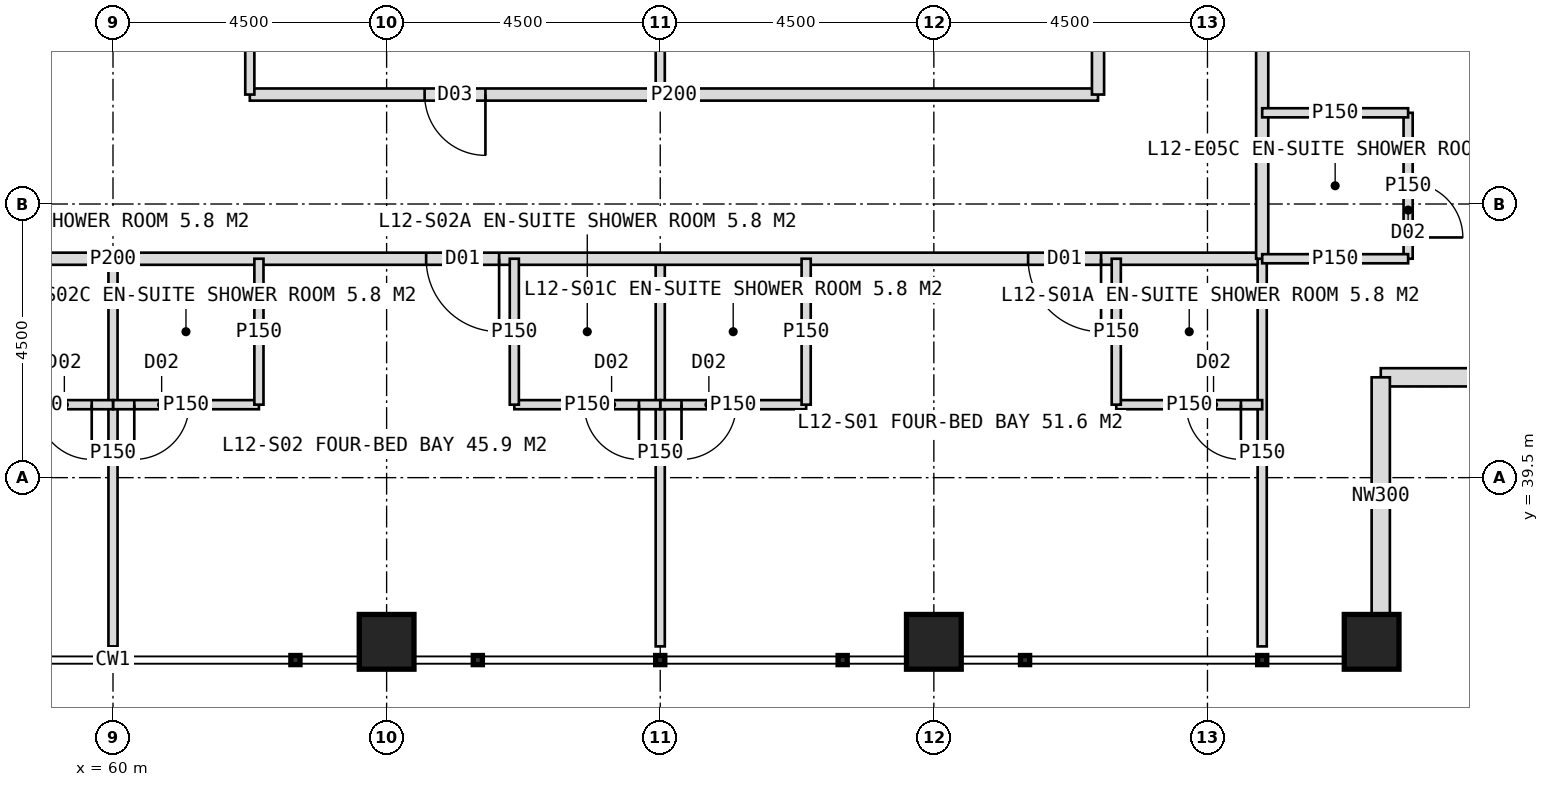
"""IFC4 building model, lengths in metres.
Left out: names, types, materials, properties, quantities, classifications, styles, units other than length and angle.
Written with IfcOpenShell. Run it as: python <this file> out.ifc"""

import sys

from ifc_helpers import new_model, si_unit, direction, frame, frame_2d, origin, origin_2d, place, context, subcontext, project, spatial, rectangle, hollow_rectangle, extrude, element, fill, save


model = new_model("IFC4")
c1 = context("Model", 3, precision=1e-05, world=origin(), true_north=direction((0.0, 1.0)))
c2 = subcontext(c1, "Body", "Model", "MODEL_VIEW")
j1 = project(units=[si_unit("LENGTHUNIT", "METRE"), si_unit("PLANEANGLEUNIT", "RADIAN")], contexts=[c1])
p1 = place(None, origin())
s1 = spatial("IfcSite", under=j1, at=p1, CompositionType="ELEMENT")
p2 = place(p1, origin())
s2 = spatial("IfcBuilding", under=s1, at=p2, CompositionType="ELEMENT")
p3 = place(p2, frame((0.0, 0.0, 55.0)))
s3 = spatial("IfcBuildingStorey", under=s2, at=p3, CompositionType="ELEMENT", Elevation=55.0)
for number, where, z_axis, x_axis in (
    (1, (64.5, 36.8, 0.0), (0.0, 0.0, 1.0), (1.0, 0.0, 0.0)),
    (2, (73.5, 36.8, 0.0), (0.0, 0.0, 1.0), (1.0, 0.0, 0.0)),
    (3, (80.7, 36.8, 0.0), (0.0, 0.0, 1.0), (1.0, 0.0, 0.0)),
):
    element("IfcColumn", number, at=place(p3, frame(where, z_axis=z_axis, x_axis=x_axis)), inside=s3, PredefinedType="COLUMN", context=c2, shape_type="SweptSolid", body=[
        extrude(hollow_rectangle(XDim=0.9, YDim=0.9, WallThickness=0.08, at=origin_2d()), origin(), (0.0, 0.0, 1.0), 4.0),
    ])
for number, where, z_axis, x_axis in (
    (4, (84.75, 41.15, 0.0), (0.0, 0.0, 1.0), (-1.0, 0.0, 0.0)),
    (5, (80.85, 41.15, 0.0), (0.0, 0.0, 1.0), (0.0, -1.0, 0.0)),
):
    element("IfcWall", number, at=place(p3, frame(where, z_axis=z_axis, x_axis=x_axis)), inside=s3, PredefinedType="ELEMENTEDWALL", context=c2, shape_type="SweptSolid", body=[
        extrude(rectangle(XDim=3.9, YDim=0.3, at=frame_2d((1.95, 0.0))), origin(), (0.0, 0.0, 1.0), 2.95),
    ])
p4 = place(p3, frame((69.0, 43.1, 0.0), z_axis=(0.0, 0.0, 1.0), x_axis=(0.0, -1.0, 0.0)))
e6 = element("IfcWall", 6, at=p4, inside=s3, PredefinedType="PARTITIONING", context=c2, shape_type="SweptSolid", body=[
    extrude(rectangle(XDim=6.375, YDim=0.15, at=frame_2d((3.188, 0.0))), origin(), (0.0, 0.0, 1.0), 3.75),
])
p5 = place(p3, frame((60.0, 43.1, 0.0), z_axis=(0.0, 0.0, 1.0), x_axis=(0.0, -1.0, 0.0)))
e7 = element("IfcWall", 7, at=p5, inside=s3, PredefinedType="PARTITIONING", context=c2, shape_type="SweptSolid", body=[
    extrude(rectangle(XDim=6.375, YDim=0.15, at=frame_2d((3.188, 0.0))), origin(), (0.0, 0.0, 1.0), 2.75),
])
p6 = place(p3, frame((78.9, 43.1, 0.0), z_axis=(0.0, 0.0, 1.0), x_axis=(-1.0, 0.0, 0.0)))
e8 = element("IfcWall", 8, at=p6, inside=s3, PredefinedType="PARTITIONING", context=c2, shape_type="SweptSolid", body=[
    extrude(rectangle(XDim=37.8, YDim=0.2, at=frame_2d((18.9, 0.0))), origin(), (0.0, 0.0, 1.0), 3.75),
])
p7 = place(p6, frame((2.65, 0.0, 0.0)))
e9 = element("IfcOpeningElement", 9, at=p7, cuts=e8, PredefinedType="OPENING", context=c2, shape_type="SweptSolid", body=[
    extrude(rectangle(XDim=1.2, YDim=2.2, at=frame_2d((0.6, 1.1))), frame((0.0, 0.11, 0.0), z_axis=(0.0, -1.0, 0.0), x_axis=(1.0, 0.0, 0.0)), (0.0, 0.0, 1.0), 0.22),
])
p8 = place(p6, frame((12.55, 0.0, 0.0)))
e10 = element("IfcOpeningElement", 10, at=p8, cuts=e8, PredefinedType="OPENING", context=c2, shape_type="SweptSolid", body=[
    extrude(rectangle(XDim=1.2, YDim=2.2, at=frame_2d((0.6, 1.1))), frame((0.0, 0.11, 0.0), z_axis=(0.0, -1.0, 0.0), x_axis=(1.0, 0.0, 0.0)), (0.0, 0.0, 1.0), 0.22),
])
p9 = place(p6, frame((21.55, 0.0, 0.0)))
e11 = element("IfcOpeningElement", 11, at=p9, cuts=e8, PredefinedType="OPENING", context=c2, shape_type="SweptSolid", body=[
    extrude(rectangle(XDim=1.2, YDim=2.2, at=frame_2d((0.6, 1.1))), frame((0.0, 0.11, 0.0), z_axis=(0.0, -1.0, 0.0), x_axis=(1.0, 0.0, 0.0)), (0.0, 0.0, 1.0), 0.22),
])
p10 = place(p6, frame((30.55, 0.0, 0.0)))
e12 = element("IfcOpeningElement", 12, at=p10, cuts=e8, PredefinedType="OPENING", context=c2, shape_type="SweptSolid", body=[
    extrude(rectangle(XDim=1.2, YDim=2.2, at=frame_2d((0.6, 1.1))), frame((0.0, 0.11, 0.0), z_axis=(0.0, -1.0, 0.0), x_axis=(1.0, 0.0, 0.0)), (0.0, 0.0, 1.0), 0.22),
])
p11 = place(p3, frame((78.9, 43.1, 0.0), z_axis=(0.0, 0.0, 1.0), x_axis=(0.0, -1.0, 0.0)))
e13 = element("IfcWall", 13, at=p11, inside=s3, PredefinedType="PARTITIONING", context=c2, shape_type="SweptSolid", body=[
    extrude(rectangle(XDim=6.375, YDim=0.15, at=frame_2d((3.188, 0.0))), origin(), (0.0, 0.0, 1.0), 3.75),
])
p12 = place(p3, frame((78.9, 40.7, 0.0), z_axis=(0.0, 0.0, 1.0), x_axis=(-1.0, 0.0, 0.0)))
e14 = element("IfcWall", 14, at=p12, inside=s3, PredefinedType="PARTITIONING", context=c2, shape_type="SweptSolid", body=[
    extrude(rectangle(XDim=2.4, YDim=0.15, at=frame_2d((1.2, 0.0))), origin(), (0.0, 0.0, 1.0), 3.75),
])
p13 = place(p12, frame((0.35, 0.0, 0.0)))
e15 = element("IfcOpeningElement", 15, at=p13, cuts=e14, PredefinedType="OPENING", context=c2, shape_type="SweptSolid", body=[
    extrude(rectangle(XDim=0.9, YDim=2.1, at=frame_2d((0.45, 1.05))), frame((0.0, 0.085, 0.0), z_axis=(0.0, -1.0, 0.0), x_axis=(1.0, 0.0, 0.0)), (0.0, 0.0, 1.0), 0.17),
])
p14 = place(p3, frame((76.5, 43.1, 0.0), z_axis=(0.0, 0.0, 1.0), x_axis=(0.0, -1.0, 0.0)))
e16 = element("IfcWall", 16, at=p14, inside=s3, PredefinedType="PARTITIONING", context=c2, shape_type="SweptSolid", body=[
    extrude(rectangle(XDim=2.4, YDim=0.15, at=frame_2d((1.2, 0.0))), origin(), (0.0, 0.0, 1.0), 3.75),
])
p15 = place(p3, frame((71.4, 40.7, 0.0), z_axis=(0.0, 0.0, 1.0), x_axis=(-1.0, 0.0, 0.0)))
e17 = element("IfcWall", 17, at=p15, inside=s3, PredefinedType="PARTITIONING", context=c2, shape_type="SweptSolid", body=[
    extrude(rectangle(XDim=2.4, YDim=0.15, at=frame_2d((1.2, 0.0))), origin(), (0.0, 0.0, 1.0), 3.75),
])
p16 = place(p15, frame((1.15, 0.0, 0.0)))
e18 = element("IfcOpeningElement", 18, at=p16, cuts=e17, PredefinedType="OPENING", context=c2, shape_type="SweptSolid", body=[
    extrude(rectangle(XDim=0.9, YDim=2.1, at=frame_2d((0.45, 1.05))), frame((0.0, 0.085, 0.0), z_axis=(0.0, -1.0, 0.0), x_axis=(1.0, 0.0, 0.0)), (0.0, 0.0, 1.0), 0.17),
])
p17 = place(p3, frame((71.4, 43.1, 0.0), z_axis=(0.0, 0.0, 1.0), x_axis=(0.0, -1.0, 0.0)))
e19 = element("IfcWall", 19, at=p17, inside=s3, PredefinedType="PARTITIONING", context=c2, shape_type="SweptSolid", body=[
    extrude(rectangle(XDim=2.4, YDim=0.15, at=frame_2d((1.2, 0.0))), origin(), (0.0, 0.0, 1.0), 3.75),
])
p18 = place(p3, frame((69.0, 40.7, 0.0), z_axis=(0.0, 0.0, 1.0), x_axis=(-1.0, 0.0, 0.0)))
e20 = element("IfcWall", 20, at=p18, inside=s3, PredefinedType="PARTITIONING", context=c2, shape_type="SweptSolid", body=[
    extrude(rectangle(XDim=2.4, YDim=0.15, at=frame_2d((1.2, 0.0))), origin(), (0.0, 0.0, 1.0), 3.75),
])
p19 = place(p18, frame((0.35, 0.0, 0.0)))
e21 = element("IfcOpeningElement", 21, at=p19, cuts=e20, PredefinedType="OPENING", context=c2, shape_type="SweptSolid", body=[
    extrude(rectangle(XDim=0.9, YDim=2.1, at=frame_2d((0.45, 1.05))), frame((0.0, 0.085, 0.0), z_axis=(0.0, -1.0, 0.0), x_axis=(1.0, 0.0, 0.0)), (0.0, 0.0, 1.0), 0.17),
])
p20 = place(p3, frame((66.6, 43.1, 0.0), z_axis=(0.0, 0.0, 1.0), x_axis=(0.0, -1.0, 0.0)))
e22 = element("IfcWall", 22, at=p20, inside=s3, PredefinedType="PARTITIONING", context=c2, shape_type="SweptSolid", body=[
    extrude(rectangle(XDim=2.4, YDim=0.15, at=frame_2d((1.2, 0.0))), origin(), (0.0, 0.0, 1.0), 3.75),
])
p21 = place(p3, frame((62.4, 40.7, 0.0), z_axis=(0.0, 0.0, 1.0), x_axis=(-1.0, 0.0, 0.0)))
e23 = element("IfcWall", 23, at=p21, inside=s3, PredefinedType="PARTITIONING", context=c2, shape_type="SweptSolid", body=[
    extrude(rectangle(XDim=2.4, YDim=0.15, at=frame_2d((1.2, 0.0))), origin(), (0.0, 0.0, 1.0), 3.75),
])
p22 = place(p21, frame((1.15, 0.0, 0.0)))
e24 = element("IfcOpeningElement", 24, at=p22, cuts=e23, PredefinedType="OPENING", context=c2, shape_type="SweptSolid", body=[
    extrude(rectangle(XDim=0.9, YDim=2.1, at=frame_2d((0.45, 1.05))), frame((0.0, 0.085, 0.0), z_axis=(0.0, -1.0, 0.0), x_axis=(1.0, 0.0, 0.0)), (0.0, 0.0, 1.0), 0.17),
])
p23 = place(p3, frame((62.4, 43.1, 0.0), z_axis=(0.0, 0.0, 1.0), x_axis=(0.0, -1.0, 0.0)))
e25 = element("IfcWall", 25, at=p23, inside=s3, PredefinedType="PARTITIONING", context=c2, shape_type="SweptSolid", body=[
    extrude(rectangle(XDim=2.4, YDim=0.15, at=frame_2d((1.2, 0.0))), origin(), (0.0, 0.0, 1.0), 3.75),
])
p24 = place(p3, frame((60.0, 40.7, 0.0), z_axis=(0.0, 0.0, 1.0), x_axis=(-1.0, 0.0, 0.0)))
e26 = element("IfcWall", 26, at=p24, inside=s3, PredefinedType="PARTITIONING", context=c2, shape_type="SweptSolid", body=[
    extrude(rectangle(XDim=2.4, YDim=0.15, at=frame_2d((1.2, 0.0))), origin(), (0.0, 0.0, 1.0), 3.75),
])
p25 = place(p24, frame((0.35, 0.0, 0.0)))
e27 = element("IfcOpeningElement", 27, at=p25, cuts=e26, PredefinedType="OPENING", context=c2, shape_type="SweptSolid", body=[
    extrude(rectangle(XDim=0.9, YDim=2.1, at=frame_2d((0.45, 1.05))), frame((0.0, 0.085, 0.0), z_axis=(0.0, -1.0, 0.0), x_axis=(1.0, 0.0, 0.0)), (0.0, 0.0, 1.0), 0.17),
])
p26 = place(p3, frame((69.0, 53.0, 0.0), z_axis=(0.0, 0.0, 1.0), x_axis=(0.0, -1.0, 0.0)))
e28 = element("IfcWall", 28, at=p26, inside=s3, PredefinedType="PARTITIONING", context=c2, shape_type="SweptSolid", body=[
    extrude(rectangle(XDim=7.2, YDim=0.15, at=frame_2d((3.6, 0.0))), origin(), (0.0, 0.0, 1.0), 3.75),
])
p27 = place(p3, frame((76.2, 45.8, 0.0), z_axis=(0.0, 0.0, 1.0), x_axis=(-1.0, 0.0, 0.0)))
e29 = element("IfcWall", 29, at=p27, inside=s3, PredefinedType="PARTITIONING", context=c2, shape_type="SweptSolid", body=[
    extrude(rectangle(XDim=13.95, YDim=0.2, at=frame_2d((6.975, 0.0))), origin(), (0.0, 0.0, 1.0), 3.75),
])
p28 = place(p27, frame((10.075, 0.0, 0.0)))
e30 = element("IfcOpeningElement", 30, at=p28, cuts=e29, PredefinedType="OPENING", context=c2, shape_type="SweptSolid", body=[
    extrude(rectangle(XDim=1.0, YDim=2.1, at=frame_2d((0.5, 1.05))), frame((0.0, 0.11, 0.0), z_axis=(0.0, -1.0, 0.0), x_axis=(1.0, 0.0, 0.0)), (0.0, 0.0, 1.0), 0.22),
])
p29 = place(p3, frame((62.25, 53.0, 0.0), z_axis=(0.0, 0.0, 1.0), x_axis=(0.0, -1.0, 0.0)))
e31 = element("IfcWall", 31, at=p29, inside=s3, PredefinedType="PARTITIONING", context=c2, shape_type="SweptSolid", body=[
    extrude(rectangle(XDim=7.2, YDim=0.15, at=frame_2d((3.6, 0.0))), origin(), (0.0, 0.0, 1.0), 3.75),
])
p30 = place(p3, frame((78.9, 80.9, 0.0), z_axis=(0.0, 0.0, 1.0), x_axis=(0.0, -1.0, 0.0)))
e32 = element("IfcWall", 32, at=p30, inside=s3, PredefinedType="PARTITIONING", context=c2, shape_type="SweptSolid", body=[
    extrude(rectangle(XDim=37.8, YDim=0.2, at=frame_2d((18.9, 0.0))), origin(), (0.0, 0.0, 1.0), 3.75),
])
p31 = place(p30, frame((3.25, 0.0, 0.0)))
e33 = element("IfcOpeningElement", 33, at=p31, cuts=e32, PredefinedType="OPENING", context=c2, shape_type="SweptSolid", body=[
    extrude(rectangle(XDim=1.2, YDim=2.2, at=frame_2d((0.6, 1.1))), frame((0.0, 0.11, 0.0), z_axis=(0.0, -1.0, 0.0), x_axis=(1.0, 0.0, 0.0)), (0.0, 0.0, 1.0), 0.22),
])
p32 = place(p30, frame((9.55, 0.0, 0.0)))
e34 = element("IfcOpeningElement", 34, at=p32, cuts=e32, PredefinedType="OPENING", context=c2, shape_type="SweptSolid", body=[
    extrude(rectangle(XDim=1.2, YDim=2.2, at=frame_2d((0.6, 1.1))), frame((0.0, 0.11, 0.0), z_axis=(0.0, -1.0, 0.0), x_axis=(1.0, 0.0, 0.0)), (0.0, 0.0, 1.0), 0.22),
])
p33 = place(p30, frame((15.55, 0.0, 0.0)))
e35 = element("IfcOpeningElement", 35, at=p33, cuts=e32, PredefinedType="OPENING", context=c2, shape_type="SweptSolid", body=[
    extrude(rectangle(XDim=1.2, YDim=2.2, at=frame_2d((0.6, 1.1))), frame((0.0, 0.11, 0.0), z_axis=(0.0, -1.0, 0.0), x_axis=(1.0, 0.0, 0.0)), (0.0, 0.0, 1.0), 0.22),
])
p34 = place(p30, frame((21.55, 0.0, 0.0)))
e36 = element("IfcOpeningElement", 36, at=p34, cuts=e32, PredefinedType="OPENING", context=c2, shape_type="SweptSolid", body=[
    extrude(rectangle(XDim=1.2, YDim=2.2, at=frame_2d((0.6, 1.1))), frame((0.0, 0.11, 0.0), z_axis=(0.0, -1.0, 0.0), x_axis=(1.0, 0.0, 0.0)), (0.0, 0.0, 1.0), 0.22),
])
p35 = place(p30, frame((30.55, 0.0, 0.0)))
e37 = element("IfcOpeningElement", 37, at=p35, cuts=e32, PredefinedType="OPENING", context=c2, shape_type="SweptSolid", body=[
    extrude(rectangle(XDim=1.2, YDim=2.2, at=frame_2d((0.6, 1.1))), frame((0.0, 0.11, 0.0), z_axis=(0.0, -1.0, 0.0), x_axis=(1.0, 0.0, 0.0)), (0.0, 0.0, 1.0), 0.22),
])
p36 = place(p3, frame((81.3, 45.5, 0.0), z_axis=(0.0, 0.0, 1.0), x_axis=(0.0, -1.0, 0.0)))
e38 = element("IfcWall", 38, at=p36, inside=s3, PredefinedType="PARTITIONING", context=c2, shape_type="SweptSolid", body=[
    extrude(rectangle(XDim=2.4, YDim=0.15, at=frame_2d((1.2, 0.0))), origin(), (0.0, 0.0, 1.0), 3.75),
])
p37 = place(p36, frame((1.15, 0.0, 0.0)))
e39 = element("IfcOpeningElement", 39, at=p37, cuts=e38, PredefinedType="OPENING", context=c2, shape_type="SweptSolid", body=[
    extrude(rectangle(XDim=0.9, YDim=2.1, at=frame_2d((0.45, 1.05))), frame((0.0, 0.085, 0.0), z_axis=(0.0, -1.0, 0.0), x_axis=(1.0, 0.0, 0.0)), (0.0, 0.0, 1.0), 0.17),
])
for number, where, z_axis, x_axis in (
    (40, (78.9, 45.5, 0.0), (0.0, 0.0, 1.0), (1.0, 0.0, 0.0)),
    (41, (78.9, 43.1, 0.0), (0.0, 0.0, 1.0), (1.0, 0.0, 0.0)),
):
    element("IfcWall", number, at=place(p3, frame(where, z_axis=z_axis, x_axis=x_axis)), inside=s3, PredefinedType="PARTITIONING", context=c2, shape_type="SweptSolid", body=[
        extrude(rectangle(XDim=2.4, YDim=0.15, at=frame_2d((1.2, 0.0))), origin(), (0.0, 0.0, 1.0), 3.75),
    ])
p38 = place(p3, frame((76.2, 62.0, 0.0), z_axis=(0.0, 0.0, 1.0), x_axis=(0.0, -1.0, 0.0)))
e42 = element("IfcWall", 42, at=p38, inside=s3, PredefinedType="PARTITIONING", context=c2, shape_type="SweptSolid", body=[
    extrude(rectangle(XDim=16.2, YDim=0.2, at=frame_2d((8.1, 0.0))), origin(), (0.0, 0.0, 1.0), 3.75),
])
p39 = place(p38, frame((4.0, 0.0, 0.0)))
e43 = element("IfcOpeningElement", 43, at=p39, cuts=e42, PredefinedType="OPENING", context=c2, shape_type="SweptSolid", body=[
    extrude(rectangle(XDim=1.0, YDim=2.1, at=frame_2d((0.5, 1.05))), frame((0.0, 0.11, 0.0), z_axis=(0.0, -1.0, 0.0), x_axis=(1.0, 0.0, 0.0)), (0.0, 0.0, 1.0), 0.22),
])
p40 = place(p38, frame((12.1, 0.0, 0.0)))
e44 = element("IfcOpeningElement", 44, at=p40, cuts=e42, PredefinedType="OPENING", context=c2, shape_type="SweptSolid", body=[
    extrude(rectangle(XDim=1.0, YDim=2.1, at=frame_2d((0.5, 1.05))), frame((0.0, 0.11, 0.0), z_axis=(0.0, -1.0, 0.0), x_axis=(1.0, 0.0, 0.0)), (0.0, 0.0, 1.0), 0.22),
])
p41 = place(p7, origin())
e45 = element("IfcDoor", 45, at=p41, inside=s3, OperationType="SINGLE_SWING_LEFT", PredefinedType="DOOR", context=c2, shape_type="SweptSolid", body=[
    extrude(rectangle(XDim=1.2, YDim=2.2, at=frame_2d((0.6, 1.1))), frame((0.0, 0.025, 0.0), z_axis=(0.0, -1.0, 0.0), x_axis=(1.0, 0.0, 0.0)), (0.0, 0.0, 1.0), 0.05),
])
fill(e9, e45)
p42 = place(p13, origin())
e46 = element("IfcDoor", 46, at=p42, inside=s3, OperationType="SINGLE_SWING_LEFT", PredefinedType="DOOR", context=c2, shape_type="SweptSolid", body=[
    extrude(rectangle(XDim=0.9, YDim=2.1, at=frame_2d((0.45, 1.05))), frame((0.0, 0.025, 0.0), z_axis=(0.0, -1.0, 0.0), x_axis=(1.0, 0.0, 0.0)), (0.0, 0.0, 1.0), 0.05),
])
fill(e15, e46)
p43 = place(p16, origin())
e47 = element("IfcDoor", 47, at=p43, inside=s3, OperationType="SINGLE_SWING_RIGHT", PredefinedType="DOOR", context=c2, shape_type="SweptSolid", body=[
    extrude(rectangle(XDim=0.9, YDim=2.1, at=frame_2d((0.45, 1.05))), frame((0.0, 0.025, 0.0), z_axis=(0.0, -1.0, 0.0), x_axis=(1.0, 0.0, 0.0)), (0.0, 0.0, 1.0), 0.05),
])
fill(e18, e47)
p44 = place(p8, origin())
e48 = element("IfcDoor", 48, at=p44, inside=s3, OperationType="SINGLE_SWING_LEFT", PredefinedType="DOOR", context=c2, shape_type="SweptSolid", body=[
    extrude(rectangle(XDim=1.2, YDim=2.2, at=frame_2d((0.6, 1.1))), frame((0.0, 0.025, 0.0), z_axis=(0.0, -1.0, 0.0), x_axis=(1.0, 0.0, 0.0)), (0.0, 0.0, 1.0), 0.05),
])
fill(e10, e48)
p45 = place(p19, origin())
e49 = element("IfcDoor", 49, at=p45, inside=s3, OperationType="SINGLE_SWING_LEFT", PredefinedType="DOOR", context=c2, shape_type="SweptSolid", body=[
    extrude(rectangle(XDim=0.9, YDim=2.1, at=frame_2d((0.45, 1.05))), frame((0.0, 0.025, 0.0), z_axis=(0.0, -1.0, 0.0), x_axis=(1.0, 0.0, 0.0)), (0.0, 0.0, 1.0), 0.05),
])
fill(e21, e49)
p46 = place(p22, origin())
e50 = element("IfcDoor", 50, at=p46, inside=s3, OperationType="SINGLE_SWING_RIGHT", PredefinedType="DOOR", context=c2, shape_type="SweptSolid", body=[
    extrude(rectangle(XDim=0.9, YDim=2.1, at=frame_2d((0.45, 1.05))), frame((0.0, 0.025, 0.0), z_axis=(0.0, -1.0, 0.0), x_axis=(1.0, 0.0, 0.0)), (0.0, 0.0, 1.0), 0.05),
])
fill(e24, e50)
p47 = place(p25, origin())
e51 = element("IfcDoor", 51, at=p47, inside=s3, OperationType="SINGLE_SWING_LEFT", PredefinedType="DOOR", context=c2, shape_type="SweptSolid", body=[
    extrude(rectangle(XDim=0.9, YDim=2.1, at=frame_2d((0.45, 1.05))), frame((0.0, 0.025, 0.0), z_axis=(0.0, -1.0, 0.0), x_axis=(1.0, 0.0, 0.0)), (0.0, 0.0, 1.0), 0.05),
])
fill(e27, e51)
p48 = place(p28, origin())
e52 = element("IfcDoor", 52, at=p48, inside=s3, OperationType="SINGLE_SWING_LEFT", PredefinedType="DOOR", context=c2, shape_type="SweptSolid", body=[
    extrude(rectangle(XDim=1.0, YDim=2.1, at=frame_2d((0.5, 1.05))), frame((0.0, 0.025, 0.0), z_axis=(0.0, -1.0, 0.0), x_axis=(1.0, 0.0, 0.0)), (0.0, 0.0, 1.0), 0.05),
])
fill(e30, e52)
p49 = place(p37, origin())
e53 = element("IfcDoor", 53, at=p49, inside=s3, OperationType="SINGLE_SWING_RIGHT", PredefinedType="DOOR", context=c2, shape_type="SweptSolid", body=[
    extrude(rectangle(XDim=0.9, YDim=2.1, at=frame_2d((0.45, 1.05))), frame((0.0, 0.025, 0.0), z_axis=(0.0, -1.0, 0.0), x_axis=(1.0, 0.0, 0.0)), (0.0, 0.0, 1.0), 0.05),
])
fill(e39, e53)
save(model, sys.argv[1])
